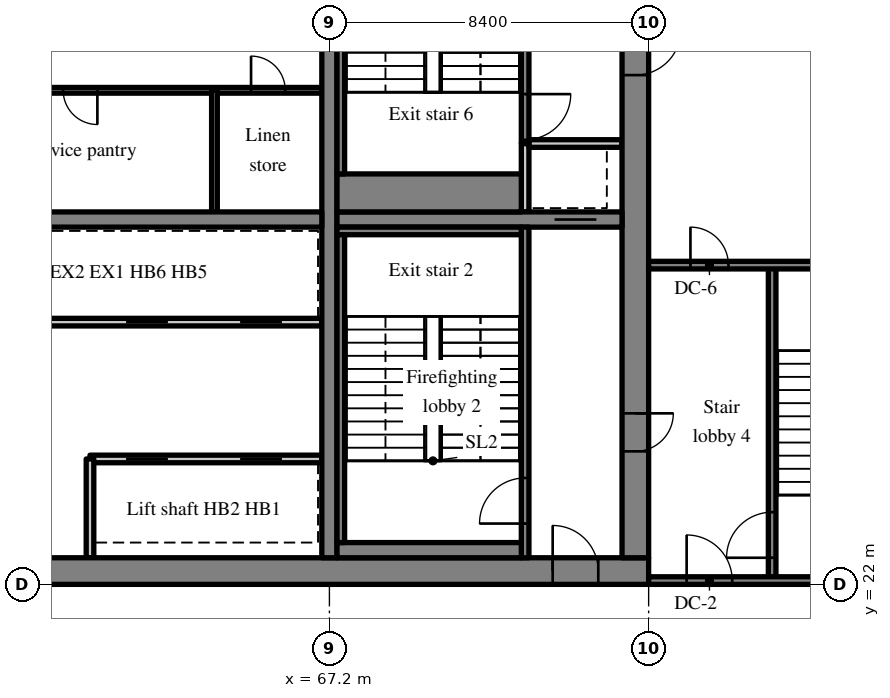
"""IFC4 building model, lengths in metres.
Left out: names, types, materials, properties, quantities, classifications, styles, units other than length and angle.
Written with IfcOpenShell. Run it as: python <this file> out.ifc"""

import sys

from ifc_helpers import new_model, si_unit, direction, frame, frame_2d, origin, place, context, subcontext, project, spatial, rectangle, extrude, source, transform, mapped, element, fill, save


model = new_model("IFC4")
c1 = context("Model", 3, precision=1e-05, world=origin(), true_north=direction((0.0, 1.0)))
c2 = subcontext(c1, "Body", "Model", "MODEL_VIEW")
j1 = project(units=[si_unit("LENGTHUNIT", "METRE"), si_unit("PLANEANGLEUNIT", "RADIAN")], contexts=[c1])
p1 = place(None, origin())
s1 = spatial("IfcSite", under=j1, at=p1, CompositionType="ELEMENT")
p2 = place(p1, origin())
s2 = spatial("IfcBuilding", under=s1, at=p2, CompositionType="ELEMENT")
p3 = place(p2, frame((0.0, 0.0, 170.6)))
s3 = spatial("IfcBuildingStorey", under=s2, at=p3, CompositionType="ELEMENT", Elevation=170.6)
m1 = source(origin(), c2, "Body", "SweptSolid", [
    extrude(rectangle(XDim=50.4, YDim=0.7, at=frame_2d((25.2, 0.0))), origin(), (0.0, 0.0, 1.0), 3.52),
])
p4 = place(p3, frame((25.2, 22.35, 0.0), z_axis=(0.0, 0.0, 1.0), x_axis=(1.0, 0.0, 0.0)))
e1 = element("IfcWall", 1, at=p4, inside=s3, PredefinedType="SHEAR", context=c2, shape_type="MappedRepresentation", body=[
    mapped(m1, transform((0.0, 0.0, 0.0), scale=1.0)),
])
m2 = source(origin(), c2, "Body", "SweptSolid", [
    extrude(rectangle(XDim=1.8, YDim=2.1, at=frame_2d((0.9, 1.05))), frame((0.0, 0.36, 0.0), z_axis=(0.0, -1.0, 0.0), x_axis=(1.0, 0.0, 0.0)), (0.0, 0.0, 1.0), 0.72),
])
p5 = place(p4, frame((15.9, 0.0, 0.0)))
e2 = element("IfcOpeningElement", 2, at=p5, cuts=e1, PredefinedType="OPENING", context=c2, shape_type="MappedRepresentation", body=[
    mapped(m2, transform((0.0, 0.0, 0.0), scale=1.0)),
])
m3 = source(origin(), c2, "Body", "SweptSolid", [
    extrude(rectangle(XDim=0.9, YDim=2.1, at=frame_2d((0.45, 1.05))), frame((0.0, 0.36, 0.0), z_axis=(0.0, -1.0, 0.0), x_axis=(1.0, 0.0, 0.0)), (0.0, 0.0, 1.0), 0.72),
])
p6 = place(p4, frame((9.7, 0.0, 0.0)))
e3 = element("IfcOpeningElement", 3, at=p6, cuts=e1, PredefinedType="OPENING", context=c2, shape_type="MappedRepresentation", body=[
    mapped(m3, transform((0.0, 0.0, 0.0), scale=1.0)),
])
p7 = place(p4, frame((21.5, 0.0, 0.0)))
e4 = element("IfcOpeningElement", 4, at=p7, cuts=e1, PredefinedType="OPENING", context=c2, shape_type="MappedRepresentation", body=[
    mapped(m3, transform((0.0, 0.0, 0.0), scale=1.0)),
])
p8 = place(p4, frame((32.7, 0.0, 0.0)))
e5 = element("IfcOpeningElement", 5, at=p8, cuts=e1, PredefinedType="OPENING", context=c2, shape_type="MappedRepresentation", body=[
    mapped(m2, transform((0.0, 0.0, 0.0), scale=1.0)),
])
m4 = source(origin(), c2, "Body", "SweptSolid", [
    extrude(rectangle(XDim=1.2, YDim=2.1, at=frame_2d((0.6, 1.05))), frame((0.0, 0.36, 0.0), z_axis=(0.0, -1.0, 0.0), x_axis=(1.0, 0.0, 0.0)), (0.0, 0.0, 1.0), 0.72),
])
p9 = place(p4, frame((6.475, 0.0, 0.0)))
e6 = element("IfcOpeningElement", 6, at=p9, cuts=e1, PredefinedType="OPENING", context=c2, shape_type="MappedRepresentation", body=[
    mapped(m4, transform((0.0, 0.0, 0.0), scale=1.0)),
])
p10 = place(p4, frame((47.875, 0.0, 0.0)))
e7 = element("IfcOpeningElement", 7, at=p10, cuts=e1, PredefinedType="OPENING", context=c2, shape_type="MappedRepresentation", body=[
    mapped(m4, transform((0.0, 0.0, 0.0), scale=1.0)),
])
m5 = source(origin(), c2, "Body", "SweptSolid", [
    extrude(rectangle(XDim=18.6, YDim=0.7, at=frame_2d((9.3, 0.0))), origin(), (0.0, 0.0, 1.0), 3.52),
])
p11 = place(p3, frame((75.25, 22.7, 0.0), z_axis=(0.0, 0.0, 1.0), x_axis=(0.0, 1.0, 0.0)))
e8 = element("IfcWall", 8, at=p11, inside=s3, PredefinedType="SHEAR", context=c2, shape_type="MappedRepresentation", body=[
    mapped(m5, transform((0.0, 0.0, 0.0), scale=1.0)),
])
m6 = source(origin(), c2, "Body", "SweptSolid", [
    extrude(rectangle(XDim=1.0, YDim=2.1, at=frame_2d((0.5, 1.05))), frame((0.0, 0.36, 0.0), z_axis=(0.0, -1.0, 0.0), x_axis=(1.0, 0.0, 0.0)), (0.0, 0.0, 1.0), 0.72),
])
p12 = place(p11, frame((2.8, 0.0, 0.0)))
e9 = element("IfcOpeningElement", 9, at=p12, cuts=e8, PredefinedType="OPENING", context=c2, shape_type="MappedRepresentation", body=[
    mapped(m6, transform((0.0, 0.0, 0.0), scale=1.0)),
])
p13 = place(p11, frame((12.7, 0.0, 0.0)))
e10 = element("IfcOpeningElement", 10, at=p13, cuts=e8, PredefinedType="OPENING", context=c2, shape_type="MappedRepresentation", body=[
    mapped(m4, transform((0.0, 0.0, 0.0), scale=1.0)),
])
m7 = source(origin(), c2, "Body", "SweptSolid", [
    extrude(rectangle(XDim=18.6, YDim=0.4, at=frame_2d((9.3, 0.0))), origin(), (0.0, 0.0, 1.0), 3.52),
])
p14 = place(p3, frame((67.2, 22.7, 0.0), z_axis=(0.0, 0.0, 1.0), x_axis=(0.0, 1.0, 0.0)))
e11 = element("IfcWall", 11, at=p14, inside=s3, PredefinedType="SHEAR", context=c2, shape_type="MappedRepresentation", body=[
    mapped(m7, transform((0.0, 0.0, 0.0), scale=1.0)),
])
m8 = source(origin(), c2, "Body", "SweptSolid", [
    extrude(rectangle(XDim=16.4, YDim=0.4, at=frame_2d((8.2, 0.0))), origin(), (0.0, 0.0, 1.0), 3.52),
])
p15 = place(p3, frame((50.6, 31.6, 0.0), z_axis=(0.0, 0.0, 1.0), x_axis=(1.0, 0.0, 0.0)))
e12 = element("IfcWall", 12, at=p15, inside=s3, PredefinedType="SHEAR", context=c2, shape_type="MappedRepresentation", body=[
    mapped(m8, transform((0.0, 0.0, 0.0), scale=1.0)),
])
m9 = source(origin(), c2, "Body", "SweptSolid", [
    extrude(rectangle(XDim=1.0, YDim=2.1, at=frame_2d((0.5, 1.05))), frame((0.0, 0.21, 0.0), z_axis=(0.0, -1.0, 0.0), x_axis=(1.0, 0.0, 0.0)), (0.0, 0.0, 1.0), 0.42),
])
p16 = place(p15, frame((0.6, 0.0, 0.0)))
e13 = element("IfcOpeningElement", 13, at=p16, cuts=e12, PredefinedType="OPENING", context=c2, shape_type="MappedRepresentation", body=[
    mapped(m9, transform((0.0, 0.0, 0.0), scale=1.0)),
])
m10 = source(origin(), c2, "Body", "SweptSolid", [
    extrude(rectangle(XDim=7.5, YDim=0.4, at=frame_2d((3.75, 0.0))), origin(), (0.0, 0.0, 1.0), 3.52),
])
p17 = place(p3, frame((67.4, 31.6, 0.0), z_axis=(0.0, 0.0, 1.0), x_axis=(1.0, 0.0, 0.0)))
e14 = element("IfcWall", 14, at=p17, inside=s3, PredefinedType="SHEAR", context=c2, shape_type="MappedRepresentation", body=[
    mapped(m10, transform((0.0, 0.0, 0.0), scale=1.0)),
])
m11 = source(origin(), c2, "Body", "SweptSolid", [
    extrude(rectangle(XDim=1.1, YDim=2.1, at=frame_2d((0.55, 1.05))), frame((0.0, 0.21, 0.0), z_axis=(0.0, -1.0, 0.0), x_axis=(1.0, 0.0, 0.0)), (0.0, 0.0, 1.0), 0.42),
])
p18 = place(p17, frame((5.725, 0.0, 0.0)))
e15 = element("IfcOpeningElement", 15, at=p18, cuts=e14, PredefinedType="OPENING", context=c2, shape_type="MappedRepresentation", body=[
    mapped(m11, transform((0.0, 0.0, 0.0), scale=1.0)),
])
m12 = source(origin(), c2, "Body", "SweptSolid", [
    extrude(rectangle(XDim=6.1, YDim=0.2, at=frame_2d((3.05, 0.0))), origin(), (0.0, 0.0, 1.0), 3.52),
])
p19 = place(p3, frame((67.0, 25.3, 0.0), z_axis=(0.0, 0.0, 1.0), x_axis=(-1.0, 0.0, 0.0)))
e16 = element("IfcWall", 16, at=p19, inside=s3, PredefinedType="SOLIDWALL", context=c2, shape_type="MappedRepresentation", body=[
    mapped(m12, transform((0.0, 0.0, 0.0), scale=1.0)),
])
m13 = source(origin(), c2, "Body", "SweptSolid", [
    extrude(rectangle(XDim=1.1, YDim=2.1, at=frame_2d((0.55, 1.05))), frame((0.0, 0.11, 0.0), z_axis=(0.0, -1.0, 0.0), x_axis=(1.0, 0.0, 0.0)), (0.0, 0.0, 1.0), 0.22),
])
p20 = place(p19, frame((1.05, 0.0, 0.0)))
e17 = element("IfcOpeningElement", 17, at=p20, cuts=e16, PredefinedType="OPENING", context=c2, shape_type="MappedRepresentation", body=[
    mapped(m13, transform((0.0, 0.0, 0.0), scale=1.0)),
])
p21 = place(p19, frame((4.05, 0.0, 0.0)))
e18 = element("IfcOpeningElement", 18, at=p21, cuts=e16, PredefinedType="OPENING", context=c2, shape_type="MappedRepresentation", body=[
    mapped(m13, transform((0.0, 0.0, 0.0), scale=1.0)),
])
m14 = source(origin(), c2, "Body", "SweptSolid", [
    extrude(rectangle(XDim=12.1, YDim=0.2, at=frame_2d((6.05, 0.0))), origin(), (0.0, 0.0, 1.0), 3.52),
])
p22 = place(p3, frame((67.0, 28.9, 0.0), z_axis=(0.0, 0.0, 1.0), x_axis=(-1.0, 0.0, 0.0)))
e19 = element("IfcWall", 19, at=p22, inside=s3, PredefinedType="SOLIDWALL", context=c2, shape_type="MappedRepresentation", body=[
    mapped(m14, transform((0.0, 0.0, 0.0), scale=1.0)),
])
p23 = place(p22, frame((1.05, 0.0, 0.0)))
e20 = element("IfcOpeningElement", 20, at=p23, cuts=e19, PredefinedType="OPENING", context=c2, shape_type="MappedRepresentation", body=[
    mapped(m13, transform((0.0, 0.0, 0.0), scale=1.0)),
])
p24 = place(p22, frame((4.05, 0.0, 0.0)))
e21 = element("IfcOpeningElement", 21, at=p24, cuts=e19, PredefinedType="OPENING", context=c2, shape_type="MappedRepresentation", body=[
    mapped(m13, transform((0.0, 0.0, 0.0), scale=1.0)),
])
m15 = source(origin(), c2, "Body", "SweptSolid", [
    extrude(rectangle(XDim=2.6, YDim=0.2, at=frame_2d((1.3, 0.0))), origin(), (0.0, 0.0, 1.0), 3.52),
])
p25 = place(p3, frame((60.9, 22.7, 0.0), z_axis=(0.0, 0.0, 1.0), x_axis=(0.0, 1.0, 0.0)))
e22 = element("IfcWall", 22, at=p25, inside=s3, PredefinedType="SOLIDWALL", context=c2, shape_type="MappedRepresentation", body=[
    mapped(m15, transform((0.0, 0.0, 0.0), scale=1.0)),
])
m16 = source(origin(), c2, "Body", "SweptSolid", [
    extrude(rectangle(XDim=14.2, YDim=0.15, at=frame_2d((7.1, 0.0))), origin(), (0.0, 0.0, 1.0), 3.52),
])
p26 = place(p3, frame((67.0, 35.0, 0.0), z_axis=(0.0, 0.0, 1.0), x_axis=(-1.0, 0.0, 0.0)))
e23 = element("IfcWall", 23, at=p26, inside=s3, PredefinedType="PARTITIONING", context=c2, shape_type="MappedRepresentation", body=[
    mapped(m16, transform((0.0, 0.0, 0.0), scale=1.0)),
])
m17 = source(origin(), c2, "Body", "SweptSolid", [
    extrude(rectangle(XDim=0.9, YDim=2.1, at=frame_2d((0.45, 1.05))), frame((0.0, 0.085, 0.0), z_axis=(0.0, -1.0, 0.0), x_axis=(1.0, 0.0, 0.0)), (0.0, 0.0, 1.0), 0.17),
])
p27 = place(p26, frame((0.962, 0.0, 0.0)))
e24 = element("IfcOpeningElement", 24, at=p27, cuts=e23, PredefinedType="OPENING", context=c2, shape_type="MappedRepresentation", body=[
    mapped(m17, transform((0.0, 0.0, 0.0), scale=1.0)),
])
p28 = place(p26, frame((5.906, 0.0, 0.0)))
e25 = element("IfcOpeningElement", 25, at=p28, cuts=e23, PredefinedType="OPENING", context=c2, shape_type="MappedRepresentation", body=[
    mapped(m17, transform((0.0, 0.0, 0.0), scale=1.0)),
])
p29 = place(p26, frame((11.556, 0.0, 0.0)))
e26 = element("IfcOpeningElement", 26, at=p29, cuts=e23, PredefinedType="OPENING", context=c2, shape_type="MappedRepresentation", body=[
    mapped(m17, transform((0.0, 0.0, 0.0), scale=1.0)),
])
m18 = source(origin(), c2, "Body", "SweptSolid", [
    extrude(rectangle(XDim=3.2, YDim=0.15, at=frame_2d((1.6, 0.0))), origin(), (0.0, 0.0, 1.0), 3.52),
])
p30 = place(p3, frame((64.175, 31.8, 0.0), z_axis=(0.0, 0.0, 1.0), x_axis=(0.0, 1.0, 0.0)))
e27 = element("IfcWall", 27, at=p30, inside=s3, PredefinedType="PARTITIONING", context=c2, shape_type="MappedRepresentation", body=[
    mapped(m18, transform((0.0, 0.0, 0.0), scale=1.0)),
])
m19 = source(origin(), c2, "Body", "SweptSolid", [
    extrude(rectangle(XDim=8.7, YDim=0.2, at=frame_2d((4.35, 0.0))), origin(), (0.0, 0.0, 1.0), 3.52),
])
p31 = place(p3, frame((72.35, 22.7, 0.0), z_axis=(0.0, 0.0, 1.0), x_axis=(0.0, 1.0, 0.0)))
e28 = element("IfcWall", 28, at=p31, inside=s3, PredefinedType="SOLIDWALL", context=c2, shape_type="MappedRepresentation", body=[
    mapped(m19, transform((0.0, 0.0, 0.0), scale=1.0)),
])
m20 = source(origin(), c2, "Body", "SweptSolid", [
    extrude(rectangle(XDim=1.2, YDim=2.1, at=frame_2d((0.6, 1.05))), frame((0.0, 0.11, 0.0), z_axis=(0.0, -1.0, 0.0), x_axis=(1.0, 0.0, 0.0)), (0.0, 0.0, 1.0), 0.22),
])
p32 = place(p31, frame((0.9, 0.0, 0.0)))
e29 = element("IfcOpeningElement", 29, at=p32, cuts=e28, PredefinedType="OPENING", context=c2, shape_type="MappedRepresentation", body=[
    mapped(m20, transform((0.0, 0.0, 0.0), scale=1.0)),
])
m21 = source(origin(), c2, "Body", "SweptSolid", [
    extrude(rectangle(XDim=1.8, YDim=0.2, at=frame_2d((0.9, 0.0))), origin(), (0.0, 0.0, 1.0), 3.52),
])
p33 = place(p3, frame((72.35, 31.8, 0.0), z_axis=(0.0, 0.0, 1.0), x_axis=(0.0, 1.0, 0.0)))
e30 = element("IfcWall", 30, at=p33, inside=s3, PredefinedType="SOLIDWALL", context=c2, shape_type="MappedRepresentation", body=[
    mapped(m21, transform((0.0, 0.0, 0.0), scale=1.0)),
])
m22 = source(origin(), c2, "Body", "SweptSolid", [
    extrude(rectangle(XDim=2.45, YDim=0.2, at=frame_2d((1.225, 0.0))), origin(), (0.0, 0.0, 1.0), 3.52),
])
p34 = place(p3, frame((72.45, 33.6, 0.0), z_axis=(0.0, 0.0, 1.0), x_axis=(1.0, 0.0, 0.0)))
e31 = element("IfcWall", 31, at=p34, inside=s3, PredefinedType="SOLIDWALL", context=c2, shape_type="MappedRepresentation", body=[
    mapped(m22, transform((0.0, 0.0, 0.0), scale=1.0)),
])
m23 = source(origin(), c2, "Body", "SweptSolid", [
    extrude(rectangle(XDim=7.7, YDim=0.2, at=frame_2d((3.85, 0.0))), origin(), (0.0, 0.0, 1.0), 3.52),
])
p35 = place(p3, frame((72.35, 33.6, 0.0), z_axis=(0.0, 0.0, 1.0), x_axis=(0.0, 1.0, 0.0)))
e32 = element("IfcWall", 32, at=p35, inside=s3, PredefinedType="SOLIDWALL", context=c2, shape_type="MappedRepresentation", body=[
    mapped(m23, transform((0.0, 0.0, 0.0), scale=1.0)),
])
p36 = place(p35, frame((0.1, 0.0, 0.0)))
e33 = element("IfcOpeningElement", 33, at=p36, cuts=e32, PredefinedType="OPENING", context=c2, shape_type="MappedRepresentation", body=[
    mapped(m20, transform((0.0, 0.0, 0.0), scale=1.0)),
])
m24 = source(origin(), c2, "Body", "SweptSolid", [
    extrude(rectangle(XDim=8.3, YDim=0.2, at=frame_2d((4.15, 0.0))), origin(), (0.0, 0.0, 1.0), 3.52),
])
p37 = place(p3, frame((78.85, 22.1, 0.0), z_axis=(0.0, 0.0, 1.0), x_axis=(0.0, 1.0, 0.0)))
e34 = element("IfcWall", 34, at=p37, inside=s3, PredefinedType="SOLIDWALL", context=c2, shape_type="MappedRepresentation", body=[
    mapped(m24, transform((0.0, 0.0, 0.0), scale=1.0)),
])
p38 = place(p37, frame((0.6, 0.0, 0.0)))
e35 = element("IfcOpeningElement", 35, at=p38, cuts=e34, PredefinedType="OPENING", context=c2, shape_type="MappedRepresentation", body=[
    mapped(m20, transform((0.0, 0.0, 0.0), scale=1.0)),
])
m25 = source(origin(), c2, "Body", "SweptSolid", [
    extrude(rectangle(XDim=8.25, YDim=0.2, at=frame_2d((4.125, 0.0))), origin(), (0.0, 0.0, 1.0), 3.52),
])
p39 = place(p3, frame((83.85, 22.1, 0.0), z_axis=(0.0, 0.0, 1.0), x_axis=(-1.0, 0.0, 0.0)))
e36 = element("IfcWall", 36, at=p39, inside=s3, PredefinedType="SOLIDWALL", context=c2, shape_type="MappedRepresentation", body=[
    mapped(m25, transform((0.0, 0.0, 0.0), scale=1.0)),
])
p40 = place(p39, frame((6.05, 0.0, 0.0)))
e37 = element("IfcOpeningElement", 37, at=p40, cuts=e36, PredefinedType="OPENING", context=c2, shape_type="MappedRepresentation", body=[
    mapped(m20, transform((0.0, 0.0, 0.0), scale=1.0)),
])
p41 = place(p3, frame((83.85, 30.4, 0.0), z_axis=(0.0, 0.0, 1.0), x_axis=(-1.0, 0.0, 0.0)))
e38 = element("IfcWall", 38, at=p41, inside=s3, PredefinedType="SOLIDWALL", context=c2, shape_type="MappedRepresentation", body=[
    mapped(m25, transform((0.0, 0.0, 0.0), scale=1.0)),
])
m26 = source(origin(), c2, "Body", "SweptSolid", [
    extrude(rectangle(XDim=1.0, YDim=2.1, at=frame_2d((0.5, 1.05))), frame((0.0, 0.11, 0.0), z_axis=(0.0, -1.0, 0.0), x_axis=(1.0, 0.0, 0.0)), (0.0, 0.0, 1.0), 0.22),
])
p42 = place(p41, frame((6.15, 0.0, 0.0)))
e39 = element("IfcOpeningElement", 39, at=p42, cuts=e38, PredefinedType="OPENING", context=c2, shape_type="MappedRepresentation", body=[
    mapped(m26, transform((0.0, 0.0, 0.0), scale=1.0)),
])
m27 = source(origin(), c2, "Body", "SweptSolid", [
    extrude(rectangle(XDim=4.85, YDim=0.4, at=frame_2d((2.425, 0.0))), origin(), (0.0, 0.0, 1.0), 3.52),
])
p43 = place(p3, frame((67.4, 22.9, 0.0), z_axis=(0.0, 0.0, 1.0), x_axis=(1.0, 0.0, 0.0)))
e40 = element("IfcWall", 40, at=p43, inside=s3, PredefinedType="SOLIDWALL", context=c2, shape_type="MappedRepresentation", body=[
    mapped(m27, transform((0.0, 0.0, 0.0), scale=1.0)),
])
m28 = source(origin(), c2, "Body", "SweptSolid", [
    extrude(rectangle(XDim=4.85, YDim=0.2, at=frame_2d((2.425, 0.0))), origin(), (0.0, 0.0, 1.0), 3.52),
])
p44 = place(p3, frame((67.4, 31.3, 0.0), z_axis=(0.0, 0.0, 1.0), x_axis=(1.0, 0.0, 0.0)))
e41 = element("IfcWall", 41, at=p44, inside=s3, PredefinedType="SOLIDWALL", context=c2, shape_type="MappedRepresentation", body=[
    mapped(m28, transform((0.0, 0.0, 0.0), scale=1.0)),
])
m29 = source(origin(), c2, "Body", "SweptSolid", [
    extrude(rectangle(XDim=8.1, YDim=0.2, at=frame_2d((4.05, 0.0))), origin(), (0.0, 0.0, 1.0), 3.52),
])
p45 = place(p3, frame((67.5, 23.1, 0.0), z_axis=(0.0, 0.0, 1.0), x_axis=(0.0, 1.0, 0.0)))
e42 = element("IfcWall", 42, at=p45, inside=s3, PredefinedType="SOLIDWALL", context=c2, shape_type="MappedRepresentation", body=[
    mapped(m29, transform((0.0, 0.0, 0.0), scale=1.0)),
])
m30 = source(origin(), c2, "Body", "SweptSolid", [
    extrude(rectangle(XDim=4.85, YDim=1.0, at=frame_2d((2.425, 0.0))), origin(), (0.0, 0.0, 1.0), 3.52),
])
p46 = place(p3, frame((67.4, 32.3, 0.0), z_axis=(0.0, 0.0, 1.0), x_axis=(1.0, 0.0, 0.0)))
e43 = element("IfcWall", 43, at=p46, inside=s3, PredefinedType="SOLIDWALL", context=c2, shape_type="MappedRepresentation", body=[
    mapped(m30, transform((0.0, 0.0, 0.0), scale=1.0)),
])
p47 = place(p3, frame((67.5, 32.8, 0.0), z_axis=(0.0, 0.0, 1.0), x_axis=(0.0, 1.0, 0.0)))
e44 = element("IfcWall", 44, at=p47, inside=s3, PredefinedType="SOLIDWALL", context=c2, shape_type="MappedRepresentation", body=[
    mapped(m29, transform((0.0, 0.0, 0.0), scale=1.0)),
])
m31 = source(origin(), c2, "Body", "SweptSolid", [
    extrude(rectangle(XDim=1.1, YDim=2.1, at=frame_2d((0.55, 1.05))), frame((0.0, 0.025, 0.0), z_axis=(0.0, -1.0, 0.0), x_axis=(1.0, 0.0, 0.0)), (0.0, 0.0, 1.0), 0.05),
])
p48 = place(p20, origin())
e45 = element("IfcDoor", 45, at=p48, inside=s3, OperationType="SLIDING_TO_RIGHT", PredefinedType="DOOR", context=c2, shape_type="MappedRepresentation", body=[
    mapped(m31, transform((0.0, 0.0, 0.0), scale=1.0)),
])
fill(e17, e45)
p49 = place(p21, origin())
e46 = element("IfcDoor", 46, at=p49, inside=s3, OperationType="SLIDING_TO_LEFT", PredefinedType="DOOR", context=c2, shape_type="MappedRepresentation", body=[
    mapped(m31, transform((0.0, 0.0, 0.0), scale=1.0)),
])
fill(e18, e46)
p50 = place(p23, origin())
e47 = element("IfcDoor", 47, at=p50, inside=s3, OperationType="SLIDING_TO_RIGHT", PredefinedType="DOOR", context=c2, shape_type="MappedRepresentation", body=[
    mapped(m31, transform((0.0, 0.0, 0.0), scale=1.0)),
])
fill(e20, e47)
p51 = place(p24, origin())
e48 = element("IfcDoor", 48, at=p51, inside=s3, OperationType="SLIDING_TO_LEFT", PredefinedType="DOOR", context=c2, shape_type="MappedRepresentation", body=[
    mapped(m31, transform((0.0, 0.0, 0.0), scale=1.0)),
])
fill(e21, e48)
m32 = source(origin(), c2, "Body", "SweptSolid", [
    extrude(rectangle(XDim=0.9, YDim=2.1, at=frame_2d((0.45, 1.05))), frame((0.0, 0.025, 0.0), z_axis=(0.0, -1.0, 0.0), x_axis=(1.0, 0.0, 0.0)), (0.0, 0.0, 1.0), 0.05),
])
p52 = place(p27, origin())
e49 = element("IfcDoor", 49, at=p52, inside=s3, OperationType="SINGLE_SWING_RIGHT", PredefinedType="DOOR", context=c2, shape_type="MappedRepresentation", body=[
    mapped(m32, transform((0.0, 0.0, 0.0), scale=1.0)),
])
fill(e24, e49)
p53 = place(p28, origin())
e50 = element("IfcDoor", 50, at=p53, inside=s3, OperationType="SINGLE_SWING_LEFT", PredefinedType="DOOR", context=c2, shape_type="MappedRepresentation", body=[
    mapped(m32, transform((0.0, 0.0, 0.0), scale=1.0)),
])
fill(e25, e50)
m33 = source(origin(), c2, "Body", "SweptSolid", [
    extrude(rectangle(XDim=1.2, YDim=2.1, at=frame_2d((0.6, 1.05))), frame((0.0, 0.025, 0.0), z_axis=(0.0, -1.0, 0.0), x_axis=(1.0, 0.0, 0.0)), (0.0, 0.0, 1.0), 0.05),
])
p54 = place(p32, origin())
e51 = element("IfcDoor", 51, at=p54, inside=s3, OperationType="SINGLE_SWING_LEFT", PredefinedType="DOOR", context=c2, shape_type="MappedRepresentation", body=[
    mapped(m33, transform((0.0, 0.0, 0.0), scale=1.0)),
])
fill(e29, e51)
m34 = source(origin(), c2, "Body", "SweptSolid", [
    extrude(rectangle(XDim=1.2, YDim=2.1, at=frame_2d((0.6, 1.05))), frame((0.0, 0.275, 0.0), z_axis=(0.0, -1.0, 0.0), x_axis=(1.0, 0.0, 0.0)), (0.0, 0.0, 1.0), 0.05),
])
p55 = place(p10, origin())
e52 = element("IfcDoor", 52, at=p55, inside=s3, OperationType="SINGLE_SWING_LEFT", PredefinedType="DOOR", context=c2, shape_type="MappedRepresentation", body=[
    mapped(m34, transform((0.0, 0.0, 0.0), scale=1.0)),
])
fill(e7, e52)
p56 = place(p18, origin())
e53 = element("IfcDoor", 53, at=p56, inside=s3, OperationType="SLIDING_TO_LEFT", PredefinedType="DOOR", context=c2, shape_type="MappedRepresentation", body=[
    mapped(m31, transform((0.0, 0.0, 0.0), scale=1.0)),
])
fill(e15, e53)
m35 = source(origin(), c2, "Body", "SweptSolid", [
    extrude(rectangle(XDim=1.0, YDim=2.1, at=frame_2d((0.5, 1.05))), frame((0.0, 0.025, 0.0), z_axis=(0.0, -1.0, 0.0), x_axis=(1.0, 0.0, 0.0)), (0.0, 0.0, 1.0), 0.05),
])
p57 = place(p12, origin())
e54 = element("IfcDoor", 54, at=p57, inside=s3, OperationType="SINGLE_SWING_RIGHT", PredefinedType="DOOR", context=c2, shape_type="MappedRepresentation", body=[
    mapped(m35, transform((0.0, 0.0, 0.0), scale=1.0)),
])
fill(e9, e54)
p58 = place(p36, origin())
e55 = element("IfcDoor", 55, at=p58, inside=s3, OperationType="SINGLE_SWING_RIGHT", PredefinedType="DOOR", context=c2, shape_type="MappedRepresentation", body=[
    mapped(m33, transform((0.0, 0.0, 0.0), scale=1.0)),
])
fill(e33, e55)
p59 = place(p13, origin())
e56 = element("IfcDoor", 56, at=p59, inside=s3, OperationType="SINGLE_SWING_RIGHT", PredefinedType="DOOR", context=c2, shape_type="MappedRepresentation", body=[
    mapped(m33, transform((0.0, 0.0, 0.0), scale=1.0)),
])
fill(e10, e56)
p60 = place(p38, origin())
e57 = element("IfcDoor", 57, at=p60, inside=s3, OperationType="SINGLE_SWING_LEFT", PredefinedType="DOOR", context=c2, shape_type="MappedRepresentation", body=[
    mapped(m33, transform((0.0, 0.0, 0.0), scale=1.0)),
])
fill(e35, e57)
p61 = place(p40, origin())
e58 = element("IfcDoor", 58, at=p61, inside=s3, OperationType="SINGLE_SWING_RIGHT", PredefinedType="DOOR", context=c2, shape_type="MappedRepresentation", body=[
    mapped(m33, transform((0.0, 0.0, 0.0), scale=1.0)),
])
fill(e37, e58)
p62 = place(p42, origin())
e59 = element("IfcDoor", 59, at=p62, inside=s3, OperationType="SINGLE_SWING_RIGHT", PredefinedType="DOOR", context=c2, shape_type="MappedRepresentation", body=[
    mapped(m35, transform((0.0, 0.0, 0.0), scale=1.0)),
])
fill(e39, e59)
save(model, sys.argv[1])
